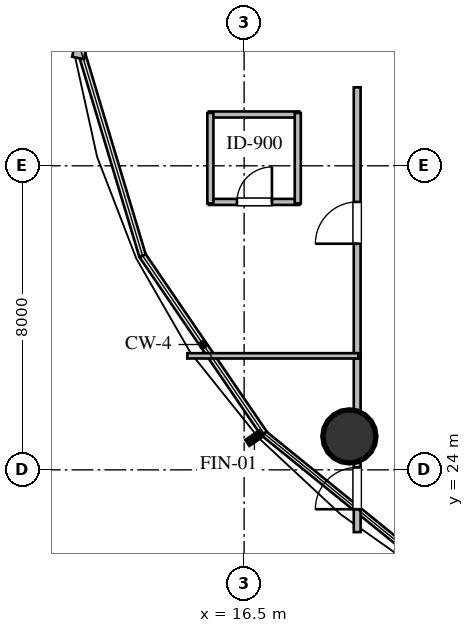
"""IFC4 building model, lengths in metres.
Left out: names, types, materials, properties, quantities, classifications, styles, units other than length and angle.
Written with IfcOpenShell. Run it as: python <this file> out.ifc"""

import sys

from ifc_helpers import new_model, si_unit, direction, frame, frame_2d, origin, origin_2d, place, context, subcontext, project, spatial, rectangle, circle, extrude, element, fill, save


model = new_model("IFC4")
c1 = context("Model", 3, precision=1e-05, world=origin(), true_north=direction((0.0, 1.0)))
c2 = subcontext(c1, "Body", "Model", "MODEL_VIEW")
j1 = project(units=[si_unit("LENGTHUNIT", "METRE"), si_unit("PLANEANGLEUNIT", "RADIAN")], contexts=[c1])
p1 = place(None, origin())
s1 = spatial("IfcSite", under=j1, at=p1, CompositionType="ELEMENT")
p2 = place(p1, origin())
s2 = spatial("IfcBuilding", under=s1, at=p2, CompositionType="ELEMENT")
p3 = place(p2, frame((0.0, 0.0, 78.0)))
s3 = spatial("IfcBuildingStorey", under=s2, at=p3, CompositionType="ELEMENT", Elevation=78.0)
p4 = place(p3, frame((19.27, 24.88, 0.0), z_axis=(0.0, 0.0, 1.0), x_axis=(1.0, 0.0, 0.0)))
e1 = element("IfcColumn", 1, at=p4, inside=s3, PredefinedType="COLUMN", context=c2, shape_type="SweptSolid", body=[
    extrude(circle(Radius=0.7, at=origin_2d()), origin(), (0.0, 0.0, 1.0), 3.6),
])
p5 = place(p3, frame((12.132, 34.837, 0.0), z_axis=(0.0, 0.0, 1.0), x_axis=(0.210310821848, 0.977634572943, 0.0)))
e2 = element("IfcWall", 2, at=p5, inside=s3, PredefinedType="STANDARD", context=c2, shape_type="SweptSolid", body=[
    extrude(rectangle(XDim=15.163, YDim=0.32, at=frame_2d((7.582, 0.0))), origin(), (0.0, 0.0, 1.0), 2.738),
])
p6 = place(p3, frame((15.572, 31.05, 0.0), z_axis=(0.0, 0.0, 1.0), x_axis=(1.0, 0.0, 0.0)))
e3 = element("IfcWall", 3, at=p6, inside=s3, PredefinedType="PLUMBINGWALL", context=c2, shape_type="SweptSolid", body=[
    extrude(rectangle(XDim=2.38, YDim=0.16, at=frame_2d((1.19, 0.0))), origin(), (0.0, 0.0, 1.0), 3.36),
])
p7 = place(p6, frame((0.74, 0.0, 0.0)))
e4 = element("IfcOpeningElement", 4, at=p7, cuts=e3, PredefinedType="OPENING", context=c2, shape_type="SweptSolid", body=[
    extrude(rectangle(XDim=0.92, YDim=2.1, at=frame_2d((0.46, 1.05))), frame((0.0, 0.09, 0.0), z_axis=(0.0, -1.0, 0.0), x_axis=(1.0, 0.0, 0.0)), (0.0, 0.0, 1.0), 0.18),
])
for number, where, z_axis, x_axis in (
    (5, (15.572, 33.35, 0.0), (0.0, 0.0, 1.0), (1.0, 0.0, 0.0)),
    (6, (15.612, 31.01, 0.0), (0.0, 0.0, 1.0), (0.0, 1.0, 0.0)),
):
    element("IfcWall", number, at=place(p3, frame(where, z_axis=z_axis, x_axis=x_axis)), inside=s3, PredefinedType="PLUMBINGWALL", context=c2, shape_type="SweptSolid", body=[
        extrude(rectangle(XDim=2.38, YDim=0.16, at=frame_2d((1.19, 0.0))), origin(), (0.0, 0.0, 1.0), 3.36),
    ])
p8 = place(p3, frame((17.912, 31.01, 0.0), z_axis=(0.0, 0.0, 1.0), x_axis=(0.0, 1.0, 0.0)))
e7 = element("IfcWall", 7, at=p8, inside=s3, PredefinedType="PLUMBINGWALL", context=c2, shape_type="SweptSolid", body=[
    extrude(rectangle(XDim=2.38, YDim=0.16, at=frame_2d((1.19, 0.0))), origin(), (0.0, 0.0, 1.0), 2.738),
])
p9 = place(p3, frame((19.475, 22.362, 0.0), z_axis=(0.0, 0.0, 1.0), x_axis=(0.0, 1.0, 0.0)))
e8 = element("IfcWall", 8, at=p9, inside=s3, PredefinedType="PARTITIONING", context=c2, shape_type="SweptSolid", body=[
    extrude(rectangle(XDim=4.703, YDim=0.18, at=frame_2d((2.352, 0.0))), origin(), (0.0, 0.0, 1.0), 2.738),
])
p10 = place(p9, frame((0.602, 0.0, 0.0)))
e9 = element("IfcOpeningElement", 9, at=p10, cuts=e8, PredefinedType="OPENING", context=c2, shape_type="SweptSolid", body=[
    extrude(rectangle(XDim=1.1, YDim=2.1, at=frame_2d((0.55, 1.05))), frame((0.0, 0.1, 0.0), z_axis=(0.0, -1.0, 0.0), x_axis=(1.0, 0.0, 0.0)), (0.0, 0.0, 1.0), 0.2),
])
p11 = place(p3, frame((19.475, 26.935, 0.0), z_axis=(0.0, 0.0, 1.0), x_axis=(0.0, 1.0, 0.0)))
e10 = element("IfcWall", 10, at=p11, inside=s3, PredefinedType="PARTITIONING", context=c2, shape_type="SweptSolid", body=[
    extrude(rectangle(XDim=7.13, YDim=0.18, at=frame_2d((3.565, 0.0))), origin(), (0.0, 0.0, 1.0), 3.36),
])
p12 = place(p11, frame((3.015, 0.0, 0.0)))
e11 = element("IfcOpeningElement", 11, at=p12, cuts=e10, PredefinedType="OPENING", context=c2, shape_type="SweptSolid", body=[
    extrude(rectangle(XDim=1.1, YDim=2.1, at=frame_2d((0.55, 1.05))), frame((0.0, 0.1, 0.0), z_axis=(0.0, -1.0, 0.0), x_axis=(1.0, 0.0, 0.0)), (0.0, 0.0, 1.0), 0.2),
])
p13 = place(p3, frame((15.006, 27.0, 0.0), z_axis=(0.0, 0.0, 1.0), x_axis=(1.0, 0.0, 0.0)))
e12 = element("IfcWall", 12, at=p13, inside=s3, PredefinedType="PARTITIONING", context=c2, shape_type="SweptSolid", body=[
    extrude(rectangle(XDim=4.499, YDim=0.14, at=frame_2d((2.25, 0.0))), origin(), (0.0, 0.0, 1.0), 3.36),
])
p14 = place(p7, origin())
e13 = element("IfcDoor", 13, at=p14, inside=s3, OperationType="SINGLE_SWING_RIGHT", PredefinedType="DOOR", context=c2, shape_type="SweptSolid", body=[
    extrude(rectangle(XDim=0.92, YDim=2.1, at=frame_2d((0.46, 1.05))), frame((0.0, 0.025, 0.0), z_axis=(0.0, -1.0, 0.0), x_axis=(1.0, 0.0, 0.0)), (0.0, 0.0, 1.0), 0.05),
])
fill(e4, e13)
p15 = place(p10, origin())
e14 = element("IfcDoor", 14, at=p15, inside=s3, OperationType="SINGLE_SWING_LEFT", PredefinedType="DOOR", context=c2, shape_type="SweptSolid", body=[
    extrude(rectangle(XDim=1.1, YDim=2.1, at=frame_2d((0.55, 1.05))), frame((0.0, 0.025, 0.0), z_axis=(0.0, -1.0, 0.0), x_axis=(1.0, 0.0, 0.0)), (0.0, 0.0, 1.0), 0.05),
])
fill(e9, e14)
p16 = place(p12, origin())
e15 = element("IfcDoor", 15, at=p16, inside=s3, OperationType="SINGLE_SWING_LEFT", PredefinedType="DOOR", context=c2, shape_type="SweptSolid", body=[
    extrude(rectangle(XDim=1.1, YDim=2.1, at=frame_2d((0.55, 1.05))), frame((0.0, 0.025, 0.0), z_axis=(0.0, -1.0, 0.0), x_axis=(1.0, 0.0, 0.0)), (0.0, 0.0, 1.0), 0.05),
])
fill(e11, e15)
save(model, sys.argv[1])
